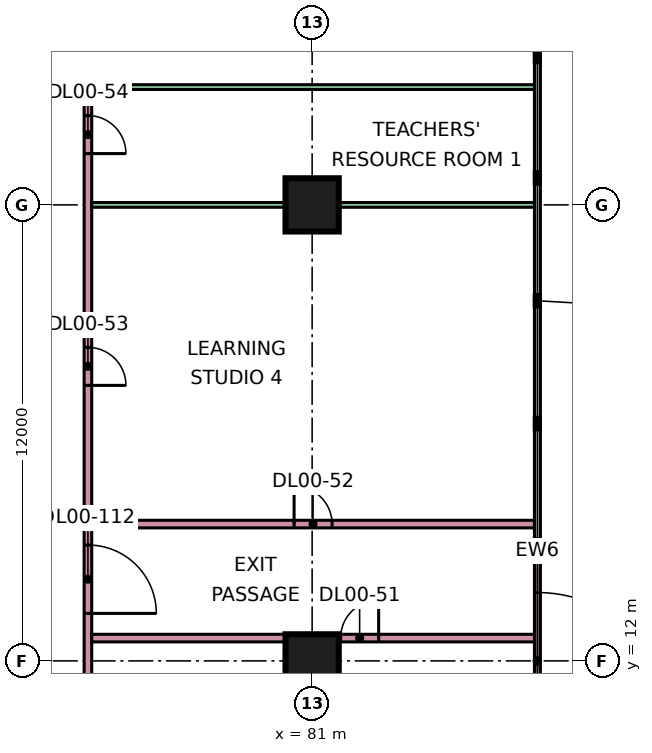
"""IFC4 building model, lengths in metres.
Left out: names, types, materials, properties, quantities, classifications, styles, units other than length and angle.
Written with IfcOpenShell. Run it as: python <this file> out.ifc"""

import sys

from ifc_helpers import new_model, si_unit, direction, frame, frame_2d, origin, origin_2d, place, context, subcontext, project, spatial, rectangle, extrude, element, fill, save


model = new_model("IFC4")
c1 = context("Model", 3, precision=1e-05, world=origin(), true_north=direction((0.0, 1.0)))
c2 = subcontext(c1, "Body", "Model", "MODEL_VIEW")
j1 = project(units=[si_unit("LENGTHUNIT", "METRE"), si_unit("PLANEANGLEUNIT", "RADIAN")], contexts=[c1])
p1 = place(None, origin())
s1 = spatial("IfcSite", under=j1, at=p1, CompositionType="ELEMENT")
p2 = place(p1, origin())
s2 = spatial("IfcBuilding", under=s1, at=p2, CompositionType="ELEMENT")
p3 = place(p2, origin())
s3 = spatial("IfcBuildingStorey", under=s2, at=p3, CompositionType="ELEMENT", Elevation=0.0)
for number, where, z_axis, x_axis in (
    (1, (81.0, 12.0, 0.0), (0.0, 0.0, 1.0), (1.0, 0.0, 0.0)),
    (2, (81.0, 24.0, 0.0), (0.0, 0.0, 1.0), (1.0, 0.0, 0.0)),
):
    element("IfcColumn", number, at=place(p3, frame(where, z_axis=z_axis, x_axis=x_axis)), inside=s3, PredefinedType="COLUMN", context=c2, shape_type="SweptSolid", body=[
        extrude(rectangle(XDim=1.4, YDim=1.4, at=origin_2d()), origin(), (0.0, 0.0, 1.0), 7.2),
    ])
p4 = place(p3, frame((86.925, 9.0, 0.0), z_axis=(0.0, 0.0, 1.0), x_axis=(0.0, 1.0, 0.0)))
e3 = element("IfcWall", 3, at=p4, inside=s3, PredefinedType="SOLIDWALL", context=c2, shape_type="SweptSolid", body=[
    extrude(rectangle(XDim=6.0, YDim=0.15, at=frame_2d((3.0, 0.0))), origin(), (0.0, 0.0, 1.0), 6.8),
])
p5 = place(p4, frame((1.2, 0.0, 0.0)))
e4 = element("IfcOpeningElement", 4, at=p5, cuts=e3, PredefinedType="OPENING", context=c2, shape_type="SweptSolid", body=[
    extrude(rectangle(XDim=3.6, YDim=2.8, at=frame_2d((1.8, 1.4))), frame((0.0, 0.085, 0.0), z_axis=(0.0, -1.0, 0.0), x_axis=(1.0, 0.0, 0.0)), (0.0, 0.0, 1.0), 0.17),
])
p6 = place(p3, frame((38.3, 27.1, 0.0), z_axis=(0.0, 0.0, 1.0), x_axis=(1.0, 0.0, 0.0)))
e5 = element("IfcWall", 5, at=p6, inside=s3, PredefinedType="PARTITIONING", context=c2, shape_type="SweptSolid", body=[
    extrude(rectangle(XDim=36.8, YDim=0.2, at=frame_2d((18.4, 0.0))), origin(), (0.0, 0.0, 1.0), 6.8),
])
p7 = place(p6, frame((10.8, 0.0, 0.0)))
e6 = element("IfcOpeningElement", 6, at=p7, cuts=e5, PredefinedType="OPENING", context=c2, shape_type="SweptSolid", body=[
    extrude(rectangle(XDim=1.0, YDim=2.1, at=frame_2d((0.5, 1.05))), frame((0.0, 0.11, 0.0), z_axis=(0.0, -1.0, 0.0), x_axis=(1.0, 0.0, 0.0)), (0.0, 0.0, 1.0), 0.22),
])
p8 = place(p6, frame((19.8, 0.0, 0.0)))
e7 = element("IfcOpeningElement", 7, at=p8, cuts=e5, PredefinedType="OPENING", context=c2, shape_type="SweptSolid", body=[
    extrude(rectangle(XDim=1.0, YDim=2.1, at=frame_2d((0.5, 1.05))), frame((0.0, 0.11, 0.0), z_axis=(0.0, -1.0, 0.0), x_axis=(1.0, 0.0, 0.0)), (0.0, 0.0, 1.0), 0.22),
])
p9 = place(p6, frame((28.8, 0.0, 0.0)))
e8 = element("IfcOpeningElement", 8, at=p9, cuts=e5, PredefinedType="OPENING", context=c2, shape_type="SweptSolid", body=[
    extrude(rectangle(XDim=1.0, YDim=2.1, at=frame_2d((0.5, 1.05))), frame((0.0, 0.11, 0.0), z_axis=(0.0, -1.0, 0.0), x_axis=(1.0, 0.0, 0.0)), (0.0, 0.0, 1.0), 0.22),
])
p10 = place(p3, frame((75.1, -3.0, 0.0), z_axis=(0.0, 0.0, 1.0), x_axis=(0.0, 1.0, 0.0)))
e9 = element("IfcWall", 9, at=p10, inside=s3, PredefinedType="PARTITIONING", context=c2, shape_type="SweptSolid", body=[
    extrude(rectangle(XDim=30.0, YDim=0.2, at=frame_2d((15.0, 0.0))), origin(), (0.0, 0.0, 1.0), 6.8),
])
p11 = place(p10, frame((0.55, 0.0, 0.0)))
e10 = element("IfcOpeningElement", 10, at=p11, cuts=e9, PredefinedType="OPENING", context=c2, shape_type="SweptSolid", body=[
    extrude(rectangle(XDim=1.0, YDim=2.1, at=frame_2d((0.5, 1.05))), frame((0.0, 0.11, 0.0), z_axis=(0.0, -1.0, 0.0), x_axis=(1.0, 0.0, 0.0)), (0.0, 0.0, 1.0), 0.22),
])
p12 = place(p10, frame((8.4, 0.0, 0.0)))
e11 = element("IfcOpeningElement", 11, at=p12, cuts=e9, PredefinedType="OPENING", context=c2, shape_type="SweptSolid", body=[
    extrude(rectangle(XDim=1.0, YDim=2.1, at=frame_2d((0.5, 1.05))), frame((0.0, 0.11, 0.0), z_axis=(0.0, -1.0, 0.0), x_axis=(1.0, 0.0, 0.0)), (0.0, 0.0, 1.0), 0.22),
])
p13 = place(p10, frame((22.25, 0.0, 0.0)))
e12 = element("IfcOpeningElement", 12, at=p13, cuts=e9, PredefinedType="OPENING", context=c2, shape_type="SweptSolid", body=[
    extrude(rectangle(XDim=1.0, YDim=2.1, at=frame_2d((0.5, 1.05))), frame((0.0, 0.11, 0.0), z_axis=(0.0, -1.0, 0.0), x_axis=(1.0, 0.0, 0.0)), (0.0, 0.0, 1.0), 0.22),
])
p14 = place(p10, frame((28.35, 0.0, 0.0)))
e13 = element("IfcOpeningElement", 13, at=p14, cuts=e9, PredefinedType="OPENING", context=c2, shape_type="SweptSolid", body=[
    extrude(rectangle(XDim=1.0, YDim=2.1, at=frame_2d((0.5, 1.05))), frame((0.0, 0.11, 0.0), z_axis=(0.0, -1.0, 0.0), x_axis=(1.0, 0.0, 0.0)), (0.0, 0.0, 1.0), 0.22),
])
p15 = place(p10, frame((16.25, 0.0, 0.0)))
e14 = element("IfcOpeningElement", 14, at=p15, cuts=e9, PredefinedType="OPENING", context=c2, shape_type="SweptSolid", body=[
    extrude(rectangle(XDim=1.8, YDim=2.1, at=frame_2d((0.9, 1.05))), frame((0.0, 0.11, 0.0), z_axis=(0.0, -1.0, 0.0), x_axis=(1.0, 0.0, 0.0)), (0.0, 0.0, 1.0), 0.22),
])
p16 = place(p3, frame((75.1, 27.1, 0.0), z_axis=(0.0, 0.0, 1.0), x_axis=(1.0, 0.0, 0.0)))
e15 = element("IfcWall", 15, at=p16, inside=s3, PredefinedType="PARTITIONING", context=c2, shape_type="SweptSolid", body=[
    extrude(rectangle(XDim=11.825, YDim=0.125, at=frame_2d((5.913, 0.0))), origin(), (0.0, 0.0, 1.0), 6.8),
])
p17 = place(p3, frame((75.2, 12.6, 0.0), z_axis=(0.0, 0.0, 1.0), x_axis=(1.0, 0.0, 0.0)))
e16 = element("IfcWall", 16, at=p17, inside=s3, PredefinedType="PARTITIONING", context=c2, shape_type="SweptSolid", body=[
    extrude(rectangle(XDim=11.651, YDim=0.2, at=frame_2d((5.826, 0.0))), origin(), (0.0, 0.0, 1.0), 6.8),
])
p18 = place(p17, frame((6.55, 0.0, 0.0)))
e17 = element("IfcOpeningElement", 17, at=p18, cuts=e16, PredefinedType="OPENING", context=c2, shape_type="SweptSolid", body=[
    extrude(rectangle(XDim=1.0, YDim=2.1, at=frame_2d((0.5, 1.05))), frame((0.0, 0.11, 0.0), z_axis=(0.0, -1.0, 0.0), x_axis=(1.0, 0.0, 0.0)), (0.0, 0.0, 1.0), 0.22),
])
p19 = place(p3, frame((75.2, 15.6, 0.0), z_axis=(0.0, 0.0, 1.0), x_axis=(1.0, 0.0, 0.0)))
e18 = element("IfcWall", 18, at=p19, inside=s3, PredefinedType="PARTITIONING", context=c2, shape_type="SweptSolid", body=[
    extrude(rectangle(XDim=11.725, YDim=0.2, at=frame_2d((5.863, 0.0))), origin(), (0.0, 0.0, 1.0), 6.8),
])
p20 = place(p19, frame((5.325, 0.0, 0.0)))
e19 = element("IfcOpeningElement", 19, at=p20, cuts=e18, PredefinedType="OPENING", context=c2, shape_type="SweptSolid", body=[
    extrude(rectangle(XDim=1.0, YDim=2.1, at=frame_2d((0.5, 1.05))), frame((0.0, 0.11, 0.0), z_axis=(0.0, -1.0, 0.0), x_axis=(1.0, 0.0, 0.0)), (0.0, 0.0, 1.0), 0.22),
])
p21 = place(p3, frame((75.2, 24.0, 0.0), z_axis=(0.0, 0.0, 1.0), x_axis=(1.0, 0.0, 0.0)))
e20 = element("IfcWall", 20, at=p21, inside=s3, PredefinedType="PARTITIONING", context=c2, shape_type="SweptSolid", body=[
    extrude(rectangle(XDim=11.725, YDim=0.125, at=frame_2d((5.863, 0.0))), origin(), (0.0, 0.0, 1.0), 6.8),
])
p22 = place(p5, frame((3.6, 0.0, 0.0), z_axis=(0.0, 0.0, 1.0), x_axis=(-1.0, 0.0, 0.0)))
e21 = element("IfcDoor", 21, at=p22, inside=s3, OperationType="DOUBLE_DOOR_SINGLE_SWING", PredefinedType="DOOR", context=c2, shape_type="SweptSolid", body=[
    extrude(rectangle(XDim=3.6, YDim=2.8, at=frame_2d((1.8, 1.4))), frame((0.0, 0.025, 0.0), z_axis=(0.0, -1.0, 0.0), x_axis=(1.0, 0.0, 0.0)), (0.0, 0.0, 1.0), 0.05),
])
fill(e4, e21)
p23 = place(p18, frame((1.0, 0.0, 0.0), z_axis=(0.0, 0.0, 1.0), x_axis=(-1.0, 0.0, 0.0)))
e22 = element("IfcDoor", 22, at=p23, inside=s3, OperationType="SINGLE_SWING_RIGHT", PredefinedType="DOOR", context=c2, shape_type="SweptSolid", body=[
    extrude(rectangle(XDim=1.0, YDim=2.1, at=frame_2d((0.5, 1.05))), frame((0.0, 0.025, 0.0), z_axis=(0.0, -1.0, 0.0), x_axis=(1.0, 0.0, 0.0)), (0.0, 0.0, 1.0), 0.05),
])
fill(e17, e22)
p24 = place(p20, origin())
e23 = element("IfcDoor", 23, at=p24, inside=s3, OperationType="SINGLE_SWING_LEFT", PredefinedType="DOOR", context=c2, shape_type="SweptSolid", body=[
    extrude(rectangle(XDim=1.0, YDim=2.1, at=frame_2d((0.5, 1.05))), frame((0.0, 0.025, 0.0), z_axis=(0.0, -1.0, 0.0), x_axis=(1.0, 0.0, 0.0)), (0.0, 0.0, 1.0), 0.05),
])
fill(e19, e23)
p25 = place(p13, frame((1.0, 0.0, 0.0), z_axis=(0.0, 0.0, 1.0), x_axis=(-1.0, 0.0, 0.0)))
e24 = element("IfcDoor", 24, at=p25, inside=s3, OperationType="SINGLE_SWING_LEFT", PredefinedType="DOOR", context=c2, shape_type="SweptSolid", body=[
    extrude(rectangle(XDim=1.0, YDim=2.1, at=frame_2d((0.5, 1.05))), frame((0.0, 0.025, 0.0), z_axis=(0.0, -1.0, 0.0), x_axis=(1.0, 0.0, 0.0)), (0.0, 0.0, 1.0), 0.05),
])
fill(e12, e24)
p26 = place(p14, frame((1.0, 0.0, 0.0), z_axis=(0.0, 0.0, 1.0), x_axis=(-1.0, 0.0, 0.0)))
e25 = element("IfcDoor", 25, at=p26, inside=s3, OperationType="SINGLE_SWING_LEFT", PredefinedType="DOOR", context=c2, shape_type="SweptSolid", body=[
    extrude(rectangle(XDim=1.0, YDim=2.1, at=frame_2d((0.5, 1.05))), frame((0.0, 0.025, 0.0), z_axis=(0.0, -1.0, 0.0), x_axis=(1.0, 0.0, 0.0)), (0.0, 0.0, 1.0), 0.05),
])
fill(e13, e25)
p27 = place(p15, frame((1.8, 0.0, 0.0), z_axis=(0.0, 0.0, 1.0), x_axis=(-1.0, 0.0, 0.0)))
e26 = element("IfcDoor", 26, at=p27, inside=s3, OperationType="DOUBLE_DOOR_SINGLE_SWING", PredefinedType="DOOR", context=c2, shape_type="SweptSolid", body=[
    extrude(rectangle(XDim=1.8, YDim=2.1, at=frame_2d((0.9, 1.05))), frame((0.0, 0.025, 0.0), z_axis=(0.0, -1.0, 0.0), x_axis=(1.0, 0.0, 0.0)), (0.0, 0.0, 1.0), 0.05),
])
fill(e14, e26)
save(model, sys.argv[1])
